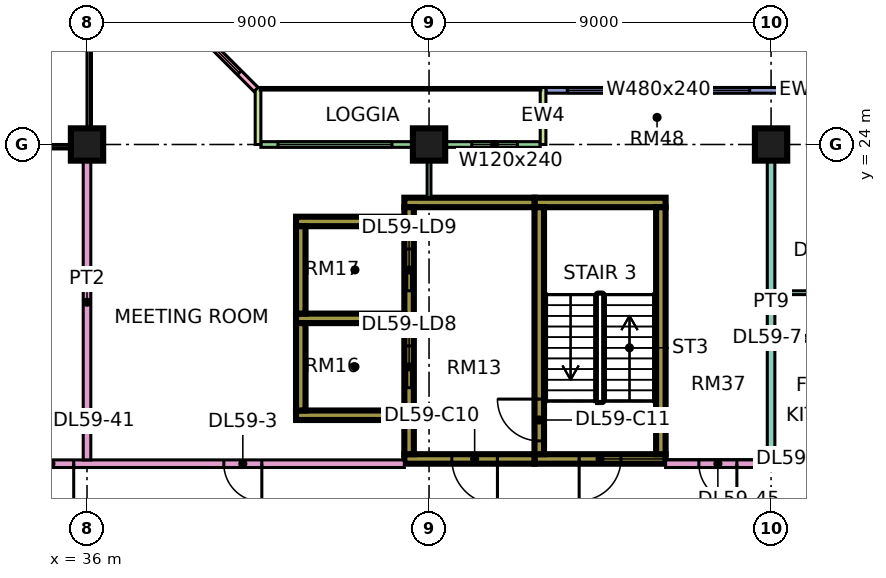
"""IFC4 building model, lengths in metres.
Left out: names, types, materials, properties, quantities, classifications, styles, units other than length and angle.
Written with IfcOpenShell. Run it as: python <this file> out.ifc"""

import sys

from ifc_helpers import new_model, si_unit, direction, frame, frame_2d, origin, origin_2d, place, context, subcontext, project, spatial, rectangle, extrude, element, fill, save


model = new_model("IFC4")
c1 = context("Model", 3, precision=1e-05, world=origin(), true_north=direction((0.0, 1.0)))
c2 = subcontext(c1, "Body", "Model", "MODEL_VIEW")
j1 = project(units=[si_unit("LENGTHUNIT", "METRE"), si_unit("PLANEANGLEUNIT", "RADIAN")], contexts=[c1])
p1 = place(None, origin())
s1 = spatial("IfcSite", under=j1, at=p1, CompositionType="ELEMENT")
p2 = place(p1, origin())
s2 = spatial("IfcBuilding", under=s1, at=p2, CompositionType="ELEMENT")
p3 = place(p2, frame((0.0, 0.0, 249.15)))
s3 = spatial("IfcBuildingStorey", under=s2, at=p3, CompositionType="ELEMENT", Elevation=249.15)
for number, where, z_axis, x_axis in (
    (1, (36.0, 24.0, 0.0), (0.0, 0.0, 1.0), (1.0, 0.0, 0.0)),
    (2, (45.0, 24.0, 0.0), (0.0, 0.0, 1.0), (1.0, 0.0, 0.0)),
    (3, (54.0, 24.0, 0.0), (0.0, 0.0, 1.0), (1.0, 0.0, 0.0)),
):
    element("IfcColumn", number, at=place(p3, frame(where, z_axis=z_axis, x_axis=x_axis)), inside=s3, PredefinedType="COLUMN", context=c2, shape_type="SweptSolid", body=[
        extrude(rectangle(XDim=0.85, YDim=0.85, at=origin_2d()), origin(), (0.0, 0.0, 1.0), 3.75),
    ])
p4 = place(p3, frame((47.775, 15.725, 0.0), z_axis=(0.0, 0.0, 1.0), x_axis=(1.0, 0.0, 0.0)))
e4 = element("IfcWall", 4, at=p4, inside=s3, PredefinedType="SHEAR", context=c2, shape_type="SweptSolid", body=[
    extrude(rectangle(XDim=3.45, YDim=0.25, at=frame_2d((1.725, 0.0))), origin(), (0.0, 0.0, 1.0), 3.75),
])
p5 = place(p4, frame((1.175, 0.0, 0.0)))
e5 = element("IfcOpeningElement", 5, at=p5, cuts=e4, PredefinedType="OPENING", context=c2, shape_type="SweptSolid", body=[
    extrude(rectangle(XDim=1.1, YDim=2.2, at=frame_2d((0.55, 1.1))), frame((0.0, 0.135, 0.0), z_axis=(0.0, -1.0, 0.0), x_axis=(1.0, 0.0, 0.0)), (0.0, 0.0, 1.0), 0.27),
])
p6 = place(p3, frame((47.775, 22.475, 0.0), z_axis=(0.0, 0.0, 1.0), x_axis=(1.0, 0.0, 0.0)))
e6 = element("IfcWall", 6, at=p6, inside=s3, PredefinedType="SHEAR", context=c2, shape_type="SweptSolid", body=[
    extrude(rectangle(XDim=3.45, YDim=0.25, at=frame_2d((1.725, 0.0))), origin(), (0.0, 0.0, 1.0), 3.75),
])
p7 = place(p3, frame((47.9, 15.85, 0.0), z_axis=(0.0, 0.0, 1.0), x_axis=(0.0, 1.0, 0.0)))
e7 = element("IfcWall", 7, at=p7, inside=s3, PredefinedType="SHEAR", context=c2, shape_type="SweptSolid", body=[
    extrude(rectangle(XDim=6.5, YDim=0.25, at=frame_2d((3.25, 0.0))), origin(), (0.0, 0.0, 1.0), 3.75),
])
p8 = place(p7, frame((0.35, 0.0, 0.0)))
e8 = element("IfcOpeningElement", 8, at=p8, cuts=e7, PredefinedType="OPENING", context=c2, shape_type="SweptSolid", body=[
    extrude(rectangle(XDim=1.1, YDim=2.2, at=frame_2d((0.55, 1.1))), frame((0.0, 0.135, 0.0), z_axis=(0.0, -1.0, 0.0), x_axis=(1.0, 0.0, 0.0)), (0.0, 0.0, 1.0), 0.27),
])
p9 = place(p3, frame((51.1, 15.85, 0.0), z_axis=(0.0, 0.0, 1.0), x_axis=(0.0, 1.0, 0.0)))
e9 = element("IfcWall", 9, at=p9, inside=s3, PredefinedType="SHEAR", context=c2, shape_type="SweptSolid", body=[
    extrude(rectangle(XDim=6.5, YDim=0.25, at=frame_2d((3.25, 0.0))), origin(), (0.0, 0.0, 1.0), 3.75),
])
p10 = place(p3, frame((44.35, 15.725, 0.0), z_axis=(0.0, 0.0, 1.0), x_axis=(1.0, 0.0, 0.0)))
e10 = element("IfcWall", 10, at=p10, inside=s3, PredefinedType="SHEAR", context=c2, shape_type="SweptSolid", body=[
    extrude(rectangle(XDim=3.425, YDim=0.25, at=frame_2d((1.712, 0.0))), origin(), (0.0, 0.0, 1.0), 3.75),
])
p11 = place(p10, frame((1.25, 0.0, 0.0)))
e11 = element("IfcOpeningElement", 11, at=p11, cuts=e10, PredefinedType="OPENING", context=c2, shape_type="SweptSolid", body=[
    extrude(rectangle(XDim=1.2, YDim=2.2, at=frame_2d((0.6, 1.1))), frame((0.0, 0.135, 0.0), z_axis=(0.0, -1.0, 0.0), x_axis=(1.0, 0.0, 0.0)), (0.0, 0.0, 1.0), 0.27),
])
p12 = place(p3, frame((44.35, 22.475, 0.0), z_axis=(0.0, 0.0, 1.0), x_axis=(1.0, 0.0, 0.0)))
e12 = element("IfcWall", 12, at=p12, inside=s3, PredefinedType="SHEAR", context=c2, shape_type="SweptSolid", body=[
    extrude(rectangle(XDim=3.425, YDim=0.25, at=frame_2d((1.712, 0.0))), origin(), (0.0, 0.0, 1.0), 3.75),
])
p13 = place(p3, frame((44.475, 15.85, 0.0), z_axis=(0.0, 0.0, 1.0), x_axis=(0.0, 1.0, 0.0)))
e13 = element("IfcWall", 13, at=p13, inside=s3, PredefinedType="SHEAR", context=c2, shape_type="SweptSolid", body=[
    extrude(rectangle(XDim=6.5, YDim=0.25, at=frame_2d((3.25, 0.0))), origin(), (0.0, 0.0, 1.0), 3.75),
])
p14 = place(p13, frame((1.75, 0.0, 0.0)))
e14 = element("IfcOpeningElement", 14, at=p14, cuts=e13, PredefinedType="OPENING", context=c2, shape_type="SweptSolid", body=[
    extrude(rectangle(XDim=1.1, YDim=2.2, at=frame_2d((0.55, 1.1))), frame((0.0, 0.135, 0.0), z_axis=(0.0, -1.0, 0.0), x_axis=(1.0, 0.0, 0.0)), (0.0, 0.0, 1.0), 0.27),
])
p15 = place(p13, frame((4.3, 0.0, 0.0)))
e15 = element("IfcOpeningElement", 15, at=p15, cuts=e13, PredefinedType="OPENING", context=c2, shape_type="SweptSolid", body=[
    extrude(rectangle(XDim=1.1, YDim=2.2, at=frame_2d((0.55, 1.1))), frame((0.0, 0.135, 0.0), z_axis=(0.0, -1.0, 0.0), x_axis=(1.0, 0.0, 0.0)), (0.0, 0.0, 1.0), 0.27),
])
for number, where, z_axis, x_axis in (
    (16, (41.5, 16.875, 0.0), (0.0, 0.0, 1.0), (1.0, 0.0, 0.0)),
    (17, (41.5, 19.425, 0.0), (0.0, 0.0, 1.0), (1.0, 0.0, 0.0)),
    (18, (41.5, 21.975, 0.0), (0.0, 0.0, 1.0), (1.0, 0.0, 0.0)),
):
    element("IfcWall", number, at=place(p3, frame(where, z_axis=z_axis, x_axis=x_axis)), inside=s3, PredefinedType="SHEAR", context=c2, shape_type="SweptSolid", body=[
        extrude(rectangle(XDim=2.85, YDim=0.25, at=frame_2d((1.425, 0.0))), origin(), (0.0, 0.0, 1.0), 3.75),
    ])
for number, where, z_axis, x_axis in (
    (19, (41.625, 17.0, 0.0), (0.0, 0.0, 1.0), (0.0, 1.0, 0.0)),
    (20, (41.625, 19.55, 0.0), (0.0, 0.0, 1.0), (0.0, 1.0, 0.0)),
):
    element("IfcWall", number, at=place(p3, frame(where, z_axis=z_axis, x_axis=x_axis)), inside=s3, PredefinedType="SHEAR", context=c2, shape_type="SweptSolid", body=[
        extrude(rectangle(XDim=2.3, YDim=0.25, at=frame_2d((1.15, 0.0))), origin(), (0.0, 0.0, 1.0), 3.75),
    ])
p16 = place(p3, frame((61.5, 25.425, 0.0), z_axis=(0.0, 0.0, 1.0), x_axis=(-1.0, 0.0, 0.0)))
e21 = element("IfcWall", 21, at=p16, inside=s3, PredefinedType="SOLIDWALL", context=c2, shape_type="SweptSolid", body=[
    extrude(rectangle(XDim=13.425, YDim=0.15, at=frame_2d((6.712, 0.0))), origin(), (0.0, 0.0, 1.0), 3.35),
])
p17 = place(p16, frame((0.3, 0.0, 0.45)))
e22 = element("IfcOpeningElement", 22, at=p17, cuts=e21, PredefinedType="OPENING", context=c2, shape_type="SweptSolid", body=[
    extrude(rectangle(XDim=0.9, YDim=2.4, at=frame_2d((0.45, 1.2))), frame((0.0, 0.085, 0.0), z_axis=(0.0, -1.0, 0.0), x_axis=(1.0, 0.0, 0.0)), (0.0, 0.0, 1.0), 0.17),
])
p18 = place(p16, frame((2.1, 0.0, 0.45)))
e23 = element("IfcOpeningElement", 23, at=p18, cuts=e21, PredefinedType="OPENING", context=c2, shape_type="SweptSolid", body=[
    extrude(rectangle(XDim=1.8, YDim=2.4, at=frame_2d((0.9, 1.2))), frame((0.0, 0.085, 0.0), z_axis=(0.0, -1.0, 0.0), x_axis=(1.0, 0.0, 0.0)), (0.0, 0.0, 1.0), 0.17),
])
p19 = place(p16, frame((5.1, 0.0, 0.45)))
e24 = element("IfcOpeningElement", 24, at=p19, cuts=e21, PredefinedType="OPENING", context=c2, shape_type="SweptSolid", body=[
    extrude(rectangle(XDim=1.8, YDim=2.4, at=frame_2d((0.9, 1.2))), frame((0.0, 0.085, 0.0), z_axis=(0.0, -1.0, 0.0), x_axis=(1.0, 0.0, 0.0)), (0.0, 0.0, 1.0), 0.17),
])
p20 = place(p16, frame((8.062, 0.0, 0.45)))
e25 = element("IfcOpeningElement", 25, at=p20, cuts=e21, PredefinedType="OPENING", context=c2, shape_type="SweptSolid", body=[
    extrude(rectangle(XDim=4.8, YDim=2.4, at=frame_2d((2.4, 1.2))), frame((0.0, 0.085, 0.0), z_axis=(0.0, -1.0, 0.0), x_axis=(1.0, 0.0, 0.0)), (0.0, 0.0, 1.0), 0.17),
])
p21 = place(p3, frame((47.925, 24.0, 0.0), z_axis=(0.0, 0.0, 1.0), x_axis=(-1.0, 0.0, 0.0)))
e26 = element("IfcWall", 26, at=p21, inside=s3, PredefinedType="SOLIDWALL", context=c2, shape_type="SweptSolid", body=[
    extrude(rectangle(XDim=7.35, YDim=0.15, at=frame_2d((3.675, 0.0))), origin(), (0.0, 0.0, 1.0), 3.35),
])
p22 = place(p21, frame((0.6, 0.0, 0.45)))
e27 = element("IfcOpeningElement", 27, at=p22, cuts=e26, PredefinedType="OPENING", context=c2, shape_type="SweptSolid", body=[
    extrude(rectangle(XDim=1.2, YDim=2.4, at=frame_2d((0.6, 1.2))), frame((0.0, 0.085, 0.0), z_axis=(0.0, -1.0, 0.0), x_axis=(1.0, 0.0, 0.0)), (0.0, 0.0, 1.0), 0.17),
])
p23 = place(p21, frame((3.9, 0.0, 0.45)))
e28 = element("IfcOpeningElement", 28, at=p23, cuts=e26, PredefinedType="OPENING", context=c2, shape_type="SweptSolid", body=[
    extrude(rectangle(XDim=3.0, YDim=2.4, at=frame_2d((1.5, 1.2))), frame((0.0, 0.085, 0.0), z_axis=(0.0, -1.0, 0.0), x_axis=(1.0, 0.0, 0.0)), (0.0, 0.0, 1.0), 0.17),
])
for number, where, z_axis, x_axis in (
    (29, (48.0, 25.5, 0.0), (0.0, 0.0, 1.0), (0.0, -1.0, 0.0)),
    (30, (40.5, 25.5, 0.0), (0.0, 0.0, 1.0), (0.0, -1.0, 0.0)),
):
    element("IfcWall", number, at=place(p3, frame(where, z_axis=z_axis, x_axis=x_axis)), inside=s3, PredefinedType="SOLIDWALL", context=c2, shape_type="SweptSolid", body=[
        extrude(rectangle(XDim=1.5, YDim=0.15, at=frame_2d((0.75, 0.0))), origin(), (0.0, 0.0, 1.0), 3.35),
    ])
p24 = place(p3, frame((40.447, 25.447, 0.0), z_axis=(0.0, 0.0, 1.0), x_axis=(-0.707106781187, 0.707106781187, 0.0)))
e31 = element("IfcWall", 31, at=p24, inside=s3, PredefinedType="SOLIDWALL", context=c2, shape_type="SweptSolid", body=[
    extrude(rectangle(XDim=4.243, YDim=0.15, at=frame_2d((2.121, 0.0))), origin(), (0.0, 0.0, 1.0), 3.35),
])
p25 = place(p24, frame((0.621, 0.0, 0.45)))
e32 = element("IfcOpeningElement", 32, at=p25, cuts=e31, PredefinedType="OPENING", context=c2, shape_type="SweptSolid", body=[
    extrude(rectangle(XDim=3.0, YDim=2.4, at=frame_2d((1.5, 1.2))), frame((0.0, 0.085, 0.0), z_axis=(0.0, -1.0, 0.0), x_axis=(1.0, 0.0, 0.0)), (0.0, 0.0, 1.0), 0.17),
])
p26 = place(p3, frame((34.0, 15.6, 0.0), z_axis=(0.0, 0.0, 1.0), x_axis=(1.0, 0.0, 0.0)))
e33 = element("IfcWall", 33, at=p26, inside=s3, PredefinedType="PARTITIONING", context=c2, shape_type="SweptSolid", body=[
    extrude(rectangle(XDim=10.35, YDim=0.2, at=frame_2d((5.175, 0.0))), origin(), (0.0, 0.0, 1.0), 3.35),
])
p27 = place(p26, frame((5.6, 0.0, 0.0)))
e34 = element("IfcOpeningElement", 34, at=p27, cuts=e33, PredefinedType="OPENING", context=c2, shape_type="SweptSolid", body=[
    extrude(rectangle(XDim=1.0, YDim=2.1, at=frame_2d((0.5, 1.05))), frame((0.0, 0.11, 0.0), z_axis=(0.0, -1.0, 0.0), x_axis=(1.0, 0.0, 0.0)), (0.0, 0.0, 1.0), 0.22),
])
p28 = place(p26, frame((0.45, 0.0, 0.0)))
e35 = element("IfcOpeningElement", 35, at=p28, cuts=e33, PredefinedType="OPENING", context=c2, shape_type="SweptSolid", body=[
    extrude(rectangle(XDim=1.2, YDim=2.1, at=frame_2d((0.6, 1.05))), frame((0.0, 0.11, 0.0), z_axis=(0.0, -1.0, 0.0), x_axis=(1.0, 0.0, 0.0)), (0.0, 0.0, 1.0), 0.22),
])
p29 = place(p3, frame((36.0, 15.7, 0.0), z_axis=(0.0, 0.0, 1.0), x_axis=(0.0, 1.0, 0.0)))
e36 = element("IfcWall", 36, at=p29, inside=s3, PredefinedType="PARTITIONING", context=c2, shape_type="SweptSolid", body=[
    extrude(rectangle(XDim=8.3, YDim=0.2, at=frame_2d((4.15, 0.0))), origin(), (0.0, 0.0, 1.0), 3.35),
])
p30 = place(p3, frame((45.0, 22.6, 0.0), z_axis=(0.0, 0.0, 1.0), x_axis=(0.0, 1.0, 0.0)))
e37 = element("IfcWall", 37, at=p30, inside=s3, PredefinedType="PARTITIONING", context=c2, shape_type="SweptSolid", body=[
    extrude(rectangle(XDim=1.326, YDim=0.1, at=frame_2d((0.663, 0.0))), origin(), (0.0, 0.0, 1.0), 3.35),
])
p31 = place(p3, frame((51.225, 15.6, 0.0), z_axis=(0.0, 0.0, 1.0), x_axis=(1.0, 0.0, 0.0)))
e38 = element("IfcWall", 38, at=p31, inside=s3, PredefinedType="PARTITIONING", context=c2, shape_type="SweptSolid", body=[
    extrude(rectangle(XDim=11.701, YDim=0.2, at=frame_2d((5.851, 0.0))), origin(), (0.0, 0.0, 1.0), 3.35),
])
p32 = place(p31, frame((9.425, 0.0, 0.0)))
e39 = element("IfcOpeningElement", 39, at=p32, cuts=e38, PredefinedType="OPENING", context=c2, shape_type="SweptSolid", body=[
    extrude(rectangle(XDim=1.0, YDim=2.1, at=frame_2d((0.5, 1.05))), frame((0.0, 0.11, 0.0), z_axis=(0.0, -1.0, 0.0), x_axis=(1.0, 0.0, 0.0)), (0.0, 0.0, 1.0), 0.22),
])
p33 = place(p31, frame((0.875, 0.0, 0.0)))
e40 = element("IfcOpeningElement", 40, at=p33, cuts=e38, PredefinedType="OPENING", context=c2, shape_type="SweptSolid", body=[
    extrude(rectangle(XDim=1.0, YDim=2.1, at=frame_2d((0.5, 1.05))), frame((0.0, 0.11, 0.0), z_axis=(0.0, -1.0, 0.0), x_axis=(1.0, 0.0, 0.0)), (0.0, 0.0, 1.0), 0.22),
])
p34 = place(p3, frame((54.0, 15.7, 0.0), z_axis=(0.0, 0.0, 1.0), x_axis=(0.0, 1.0, 0.0)))
e41 = element("IfcWall", 41, at=p34, inside=s3, PredefinedType="PARTITIONING", context=c2, shape_type="SweptSolid", body=[
    extrude(rectangle(XDim=8.3, YDim=0.2, at=frame_2d((4.15, 0.0))), origin(), (0.0, 0.0, 1.0), 3.35),
])
p35 = place(p3, frame((54.1, 18.9, 0.0), z_axis=(0.0, 0.0, 1.0), x_axis=(1.0, 0.0, 0.0)))
e42 = element("IfcWall", 42, at=p35, inside=s3, PredefinedType="PARTITIONING", context=c2, shape_type="SweptSolid", body=[
    extrude(rectangle(XDim=5.375, YDim=0.15, at=frame_2d((2.688, 0.0))), origin(), (0.0, 0.0, 1.0), 3.35),
])
p36 = place(p35, frame((3.65, 0.0, 0.0)))
e43 = element("IfcOpeningElement", 43, at=p36, cuts=e42, PredefinedType="OPENING", context=c2, shape_type="SweptSolid", body=[
    extrude(rectangle(XDim=0.8, YDim=2.1, at=frame_2d((0.4, 1.05))), frame((0.0, 0.085, 0.0), z_axis=(0.0, -1.0, 0.0), x_axis=(1.0, 0.0, 0.0)), (0.0, 0.0, 1.0), 0.17),
])
p37 = place(p35, frame((0.95, 0.0, 0.0)))
e44 = element("IfcOpeningElement", 44, at=p37, cuts=e42, PredefinedType="OPENING", context=c2, shape_type="SweptSolid", body=[
    extrude(rectangle(XDim=0.9, YDim=2.1, at=frame_2d((0.45, 1.05))), frame((0.0, 0.085, 0.0), z_axis=(0.0, -1.0, 0.0), x_axis=(1.0, 0.0, 0.0)), (0.0, 0.0, 1.0), 0.17),
])
p38 = place(p3, frame((54.1, 20.1, 0.0), z_axis=(0.0, 0.0, 1.0), x_axis=(1.0, 0.0, 0.0)))
e45 = element("IfcWall", 45, at=p38, inside=s3, PredefinedType="PARTITIONING", context=c2, shape_type="SweptSolid", body=[
    extrude(rectangle(XDim=2.85, YDim=0.1, at=frame_2d((1.425, 0.0))), origin(), (0.0, 0.0, 1.0), 3.35),
])
p39 = place(p38, frame((0.95, 0.0, 0.0)))
e46 = element("IfcOpeningElement", 46, at=p39, cuts=e45, PredefinedType="OPENING", context=c2, shape_type="SweptSolid", body=[
    extrude(rectangle(XDim=0.9, YDim=2.1, at=frame_2d((0.45, 1.05))), frame((0.0, 0.06, 0.0), z_axis=(0.0, -1.0, 0.0), x_axis=(1.0, 0.0, 0.0)), (0.0, 0.0, 1.0), 0.12),
])
p40 = place(p19, origin())
e47 = element("IfcWindow", 47, at=p40, inside=s3, PartitioningType="SINGLE_PANEL", PredefinedType="WINDOW", context=c2, shape_type="SweptSolid", body=[
    extrude(rectangle(XDim=1.8, YDim=2.4, at=frame_2d((0.9, 1.2))), frame((0.0, 0.03, 0.0), z_axis=(0.0, -1.0, 0.0), x_axis=(1.0, 0.0, 0.0)), (0.0, 0.0, 1.0), 0.06),
])
fill(e24, e47)
p41 = place(p20, origin())
e48 = element("IfcWindow", 48, at=p41, inside=s3, PartitioningType="SINGLE_PANEL", PredefinedType="WINDOW", context=c2, shape_type="SweptSolid", body=[
    extrude(rectangle(XDim=4.8, YDim=2.4, at=frame_2d((2.4, 1.2))), frame((0.0, 0.03, 0.0), z_axis=(0.0, -1.0, 0.0), x_axis=(1.0, 0.0, 0.0)), (0.0, 0.0, 1.0), 0.06),
])
fill(e25, e48)
p42 = place(p22, origin())
e49 = element("IfcWindow", 49, at=p42, inside=s3, PartitioningType="SINGLE_PANEL", PredefinedType="WINDOW", context=c2, shape_type="SweptSolid", body=[
    extrude(rectangle(XDim=1.2, YDim=2.4, at=frame_2d((0.6, 1.2))), frame((0.0, 0.03, 0.0), z_axis=(0.0, -1.0, 0.0), x_axis=(1.0, 0.0, 0.0)), (0.0, 0.0, 1.0), 0.06),
])
fill(e27, e49)
p43 = place(p23, origin())
e50 = element("IfcWindow", 50, at=p43, inside=s3, PartitioningType="SINGLE_PANEL", PredefinedType="WINDOW", context=c2, shape_type="SweptSolid", body=[
    extrude(rectangle(XDim=3.0, YDim=2.4, at=frame_2d((1.5, 1.2))), frame((0.0, 0.03, 0.0), z_axis=(0.0, -1.0, 0.0), x_axis=(1.0, 0.0, 0.0)), (0.0, 0.0, 1.0), 0.06),
])
fill(e28, e50)
p44 = place(p25, origin())
e51 = element("IfcWindow", 51, at=p44, inside=s3, PartitioningType="SINGLE_PANEL", PredefinedType="WINDOW", context=c2, shape_type="SweptSolid", body=[
    extrude(rectangle(XDim=3.0, YDim=2.4, at=frame_2d((1.5, 1.2))), frame((0.0, 0.03, 0.0), z_axis=(0.0, -1.0, 0.0), x_axis=(1.0, 0.0, 0.0)), (0.0, 0.0, 1.0), 0.06),
])
fill(e32, e51)
p45 = place(p5, frame((1.1, 0.0, 0.0), z_axis=(0.0, 0.0, 1.0), x_axis=(-1.0, 0.0, 0.0)))
e52 = element("IfcDoor", 52, at=p45, inside=s3, OperationType="SINGLE_SWING_LEFT", PredefinedType="DOOR", context=c2, shape_type="SweptSolid", body=[
    extrude(rectangle(XDim=1.1, YDim=2.2, at=frame_2d((0.55, 1.1))), frame((0.0, 0.025, 0.0), z_axis=(0.0, -1.0, 0.0), x_axis=(1.0, 0.0, 0.0)), (0.0, 0.0, 1.0), 0.05),
])
fill(e5, e52)
p46 = place(p11, origin())
e53 = element("IfcDoor", 53, at=p46, inside=s3, OperationType="SINGLE_SWING_RIGHT", PredefinedType="DOOR", context=c2, shape_type="SweptSolid", body=[
    extrude(rectangle(XDim=1.2, YDim=2.2, at=frame_2d((0.6, 1.1))), frame((0.0, 0.025, 0.0), z_axis=(0.0, -1.0, 0.0), x_axis=(1.0, 0.0, 0.0)), (0.0, 0.0, 1.0), 0.05),
])
fill(e11, e53)
p47 = place(p8, frame((1.1, 0.0, 0.0), z_axis=(0.0, 0.0, 1.0), x_axis=(-1.0, 0.0, 0.0)))
e54 = element("IfcDoor", 54, at=p47, inside=s3, OperationType="SINGLE_SWING_RIGHT", PredefinedType="DOOR", context=c2, shape_type="SweptSolid", body=[
    extrude(rectangle(XDim=1.1, YDim=2.2, at=frame_2d((0.55, 1.1))), frame((0.0, 0.025, 0.0), z_axis=(0.0, -1.0, 0.0), x_axis=(1.0, 0.0, 0.0)), (0.0, 0.0, 1.0), 0.05),
])
fill(e8, e54)
p48 = place(p14, origin())
e55 = element("IfcDoor", 55, at=p48, inside=s3, OperationType="DOUBLE_DOOR_SLIDING", PredefinedType="DOOR", context=c2, shape_type="SweptSolid", body=[
    extrude(rectangle(XDim=1.1, YDim=2.2, at=frame_2d((0.55, 1.1))), frame((0.0, 0.025, 0.0), z_axis=(0.0, -1.0, 0.0), x_axis=(1.0, 0.0, 0.0)), (0.0, 0.0, 1.0), 0.05),
])
fill(e14, e55)
p49 = place(p15, origin())
e56 = element("IfcDoor", 56, at=p49, inside=s3, OperationType="DOUBLE_DOOR_SLIDING", PredefinedType="DOOR", context=c2, shape_type="SweptSolid", body=[
    extrude(rectangle(XDim=1.1, YDim=2.2, at=frame_2d((0.55, 1.1))), frame((0.0, 0.025, 0.0), z_axis=(0.0, -1.0, 0.0), x_axis=(1.0, 0.0, 0.0)), (0.0, 0.0, 1.0), 0.05),
])
fill(e15, e56)
p50 = place(p27, origin())
e57 = element("IfcDoor", 57, at=p50, inside=s3, OperationType="SINGLE_SWING_RIGHT", PredefinedType="DOOR", context=c2, shape_type="SweptSolid", body=[
    extrude(rectangle(XDim=1.0, YDim=2.1, at=frame_2d((0.5, 1.05))), frame((0.0, 0.025, 0.0), z_axis=(0.0, -1.0, 0.0), x_axis=(1.0, 0.0, 0.0)), (0.0, 0.0, 1.0), 0.05),
])
fill(e34, e57)
p51 = place(p28, origin())
e58 = element("IfcDoor", 58, at=p51, inside=s3, OperationType="SINGLE_SWING_RIGHT", PredefinedType="DOOR", context=c2, shape_type="SweptSolid", body=[
    extrude(rectangle(XDim=1.2, YDim=2.1, at=frame_2d((0.6, 1.05))), frame((0.0, 0.025, 0.0), z_axis=(0.0, -1.0, 0.0), x_axis=(1.0, 0.0, 0.0)), (0.0, 0.0, 1.0), 0.05),
])
fill(e35, e58)
p52 = place(p33, origin())
e59 = element("IfcDoor", 59, at=p52, inside=s3, OperationType="SINGLE_SWING_RIGHT", PredefinedType="DOOR", context=c2, shape_type="SweptSolid", body=[
    extrude(rectangle(XDim=1.0, YDim=2.1, at=frame_2d((0.5, 1.05))), frame((0.0, 0.025, 0.0), z_axis=(0.0, -1.0, 0.0), x_axis=(1.0, 0.0, 0.0)), (0.0, 0.0, 1.0), 0.05),
])
fill(e40, e59)
save(model, sys.argv[1])
